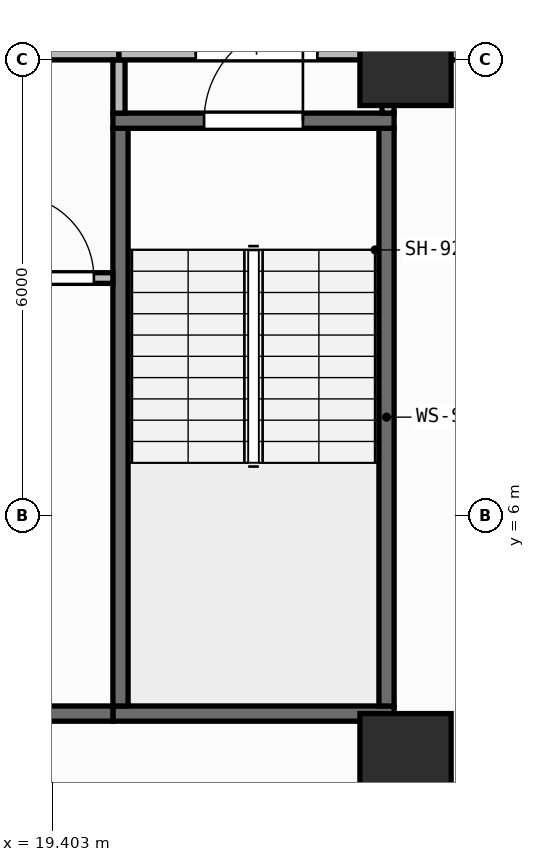
"""IFC4 building model, lengths in metres.
Left out: names, types, materials, properties, quantities, classifications, styles, units other than length and angle.
Written with IfcOpenShell. Run it as: python <this file> out.ifc"""

import sys

from ifc_helpers import new_model, si_unit, direction, frame, frame_2d, origin, origin_2d, place, context, subcontext, project, spatial, rectangle, extrude, element, fill, save


model = new_model("IFC4")
c1 = context("Model", 3, precision=1e-05, world=origin(), true_north=direction((0.0, 1.0)))
c2 = subcontext(c1, "Body", "Model", "MODEL_VIEW")
j1 = project(units=[si_unit("LENGTHUNIT", "METRE"), si_unit("PLANEANGLEUNIT", "RADIAN")], contexts=[c1])
p1 = place(None, origin())
s1 = spatial("IfcSite", under=j1, at=p1, CompositionType="ELEMENT")
p2 = place(p1, origin())
s2 = spatial("IfcBuilding", under=s1, at=p2, CompositionType="ELEMENT")
p3 = place(p2, frame((0.0, 0.0, 131.0)))
s3 = spatial("IfcBuildingStorey", under=s2, at=p3, CompositionType="ELEMENT", Elevation=131.0)
for number, where, z_axis, x_axis in (
    (1, (24.05, 2.8, 0.0), (0.0, 0.0, 1.0), (1.0, 0.0, 0.0)),
    (2, (24.05, 12.0, 0.0), (0.0, 0.0, 1.0), (1.0, 0.0, 0.0)),
):
    element("IfcColumn", number, at=place(p3, frame(where, z_axis=z_axis, x_axis=x_axis)), inside=s3, PredefinedType="COLUMN", context=c2, shape_type="SweptSolid", body=[
        extrude(rectangle(XDim=1.2, YDim=1.2, at=origin_2d()), origin(), (0.0, 0.0, 1.0), 3.95),
    ])
p4 = place(p3, frame((2.76, 0.173, 0.0), z_axis=(0.0, 0.0, 1.0), x_axis=(0.996857931723, 0.079210251617, 0.0)))
e3 = element("IfcWall", 3, at=p4, inside=s3, PredefinedType="STANDARD", context=c2, shape_type="SweptSolid", body=[
    extrude(rectangle(XDim=51.442, YDim=0.26, at=frame_2d((25.721, 0.0))), origin(), (0.0, 0.0, 1.0), 3.71),
])
p5 = place(p4, frame((24.521, 0.0, 0.9)))
e4 = element("IfcOpeningElement", 4, at=p5, cuts=e3, PredefinedType="OPENING", context=c2, shape_type="SweptSolid", body=[
    extrude(rectangle(XDim=2.4, YDim=1.65, at=frame_2d((1.2, 0.825))), frame((0.0, 0.14, 0.0), z_axis=(0.0, -1.0, 0.0), x_axis=(1.0, 0.0, 0.0)), (0.0, 0.0, 1.0), 0.28),
])
p6 = place(p3, frame((20.2, 3.4, 0.0), z_axis=(0.0, 0.0, 1.0), x_axis=(1.0, 0.0, 0.0)))
e5 = element("IfcWall", 5, at=p6, inside=s3, PredefinedType="SHEAR", context=c2, shape_type="SweptSolid", body=[
    extrude(rectangle(XDim=3.7, YDim=0.2, at=frame_2d((1.85, 0.0))), origin(), (0.0, 0.0, 1.0), 3.71),
])
for number, where, z_axis, x_axis in (
    (6, (20.3, 3.5, 0.0), (0.0, 0.0, 1.0), (0.0, 1.0, 0.0)),
    (7, (23.8, 3.5, 0.0), (0.0, 0.0, 1.0), (0.0, 1.0, 0.0)),
):
    element("IfcWall", number, at=place(p3, frame(where, z_axis=z_axis, x_axis=x_axis)), inside=s3, PredefinedType="SHEAR", context=c2, shape_type="SweptSolid", body=[
        extrude(rectangle(XDim=7.6, YDim=0.2, at=frame_2d((3.8, 0.0))), origin(), (0.0, 0.0, 1.0), 3.71),
    ])
p7 = place(p3, frame((20.2, 11.2, 0.0), z_axis=(0.0, 0.0, 1.0), x_axis=(1.0, 0.0, 0.0)))
e8 = element("IfcWall", 8, at=p7, inside=s3, PredefinedType="SHEAR", context=c2, shape_type="SweptSolid", body=[
    extrude(rectangle(XDim=3.7, YDim=0.2, at=frame_2d((1.85, 0.0))), origin(), (0.0, 0.0, 1.0), 3.71),
])
p8 = place(p7, frame((1.2, 0.0, 0.0)))
e9 = element("IfcOpeningElement", 9, at=p8, cuts=e8, PredefinedType="OPENING", context=c2, shape_type="SweptSolid", body=[
    extrude(rectangle(XDim=1.3, YDim=2.15, at=frame_2d((0.65, 1.075))), frame((0.0, 0.11, 0.0), z_axis=(0.0, -1.0, 0.0), x_axis=(1.0, 0.0, 0.0)), (0.0, 0.0, 1.0), 0.22),
])
p9 = place(p3, frame((6.5, 3.4, 0.0), z_axis=(0.0, 0.0, 1.0), x_axis=(1.0, 0.0, 0.0)))
e10 = element("IfcWall", 10, at=p9, inside=s3, PredefinedType="SHEAR", context=c2, shape_type="SweptSolid", body=[
    extrude(rectangle(XDim=13.7, YDim=0.2, at=frame_2d((6.85, 0.0))), origin(), (0.0, 0.0, 1.0), 3.71),
])
p10 = place(p3, frame((18.61, 9.13, 0.0), z_axis=(0.0, 0.0, 1.0), x_axis=(1.0, 0.0, 0.0)))
e11 = element("IfcWall", 11, at=p10, inside=s3, PredefinedType="PARTITIONING", context=c2, shape_type="SweptSolid", body=[
    extrude(rectangle(XDim=1.59, YDim=0.14, at=frame_2d((0.795, 0.0))), origin(), (0.0, 0.0, 1.0), 3.71),
])
p11 = place(p10, frame((0.24, 0.0, 0.0)))
e12 = element("IfcOpeningElement", 12, at=p11, cuts=e11, PredefinedType="OPENING", context=c2, shape_type="SweptSolid", body=[
    extrude(rectangle(XDim=1.1, YDim=2.1, at=frame_2d((0.55, 1.05))), frame((0.0, 0.08, 0.0), z_axis=(0.0, -1.0, 0.0), x_axis=(1.0, 0.0, 0.0)), (0.0, 0.0, 1.0), 0.16),
])
p12 = place(p3, frame((12.58, 12.08, 0.0), z_axis=(0.0, 0.0, 1.0), x_axis=(1.0, 0.0, 0.0)))
e13 = element("IfcWall", 13, at=p12, inside=s3, PredefinedType="PARTITIONING", context=c2, shape_type="SweptSolid", body=[
    extrude(rectangle(XDim=7.7, YDim=0.16, at=frame_2d((3.85, 0.0))), origin(), (0.0, 0.0, 1.0), 3.083),
])
p13 = place(p12, frame((3.05, 0.0, 0.0)))
e14 = element("IfcOpeningElement", 14, at=p13, cuts=e13, PredefinedType="OPENING", context=c2, shape_type="SweptSolid", body=[
    extrude(rectangle(XDim=1.6, YDim=2.05, at=frame_2d((0.8, 1.025))), frame((0.0, 0.09, 0.0), z_axis=(0.0, -1.0, 0.0), x_axis=(1.0, 0.0, 0.0)), (0.0, 0.0, 1.0), 0.18),
])
p14 = place(p3, frame((20.28, 11.3, 0.0), z_axis=(0.0, 0.0, 1.0), x_axis=(0.0, 1.0, 0.0)))
e15 = element("IfcWall", 15, at=p14, inside=s3, PredefinedType="PARTITIONING", context=c2, shape_type="SweptSolid", body=[
    extrude(rectangle(XDim=0.7, YDim=0.16, at=frame_2d((0.35, 0.0))), origin(), (0.0, 0.0, 1.0), 3.71),
])
p15 = place(p3, frame((20.28, 12.08, 0.0), z_axis=(0.0, 0.0, 1.0), x_axis=(1.0, 0.0, 0.0)))
e16 = element("IfcWall", 16, at=p15, inside=s3, PredefinedType="PARTITIONING", context=c2, shape_type="SweptSolid", body=[
    extrude(rectangle(XDim=3.62, YDim=0.16, at=frame_2d((1.81, 0.0))), origin(), (0.0, 0.0, 1.0), 3.083),
])
p16 = place(p15, frame((1.01, 0.0, 0.0)))
e17 = element("IfcOpeningElement", 17, at=p16, cuts=e16, PredefinedType="OPENING", context=c2, shape_type="SweptSolid", body=[
    extrude(rectangle(XDim=1.6, YDim=2.05, at=frame_2d((0.8, 1.025))), frame((0.0, 0.09, 0.0), z_axis=(0.0, -1.0, 0.0), x_axis=(1.0, 0.0, 0.0)), (0.0, 0.0, 1.0), 0.18),
])
p17 = place(p3, frame((23.82, 11.3, 0.0), z_axis=(0.0, 0.0, 1.0), x_axis=(0.0, 1.0, 0.0)))
e18 = element("IfcWall", 18, at=p17, inside=s3, PredefinedType="PARTITIONING", context=c2, shape_type="SweptSolid", body=[
    extrude(rectangle(XDim=0.7, YDim=0.16, at=frame_2d((0.35, 0.0))), origin(), (0.0, 0.0, 1.0), 3.71),
])
p18 = place(p3, frame((24.02, 12.08, 0.0), z_axis=(0.0, 0.0, 1.0), x_axis=(1.0, 0.0, 0.0)))
e19 = element("IfcWall", 19, at=p18, inside=s3, PredefinedType="PARTITIONING", context=c2, shape_type="SweptSolid", body=[
    extrude(rectangle(XDim=1.245, YDim=0.16, at=frame_2d((0.623, 0.0))), origin(), (0.0, 0.0, 1.0), 3.083),
])
p19 = place(p8, origin())
e20 = element("IfcDoor", 20, at=p19, inside=s3, OperationType="SINGLE_SWING_RIGHT", PredefinedType="DOOR", context=c2, shape_type="SweptSolid", body=[
    extrude(rectangle(XDim=1.3, YDim=2.15, at=frame_2d((0.65, 1.075))), frame((0.0, 0.025, 0.0), z_axis=(0.0, -1.0, 0.0), x_axis=(1.0, 0.0, 0.0)), (0.0, 0.0, 1.0), 0.05),
])
fill(e9, e20)
p20 = place(p11, origin())
e21 = element("IfcDoor", 21, at=p20, inside=s3, OperationType="SINGLE_SWING_LEFT", PredefinedType="DOOR", context=c2, shape_type="SweptSolid", body=[
    extrude(rectangle(XDim=1.1, YDim=2.1, at=frame_2d((0.55, 1.05))), frame((0.0, 0.025, 0.0), z_axis=(0.0, -1.0, 0.0), x_axis=(1.0, 0.0, 0.0)), (0.0, 0.0, 1.0), 0.05),
])
fill(e12, e21)
p21 = place(p16, origin())
e22 = element("IfcDoor", 22, at=p21, inside=s3, OperationType="DOUBLE_DOOR_SINGLE_SWING", PredefinedType="DOOR", context=c2, shape_type="SweptSolid", body=[
    extrude(rectangle(XDim=1.6, YDim=2.05, at=frame_2d((0.8, 1.025))), frame((0.0, 0.025, 0.0), z_axis=(0.0, -1.0, 0.0), x_axis=(1.0, 0.0, 0.0)), (0.0, 0.0, 1.0), 0.05),
])
fill(e17, e22)
save(model, sys.argv[1])
